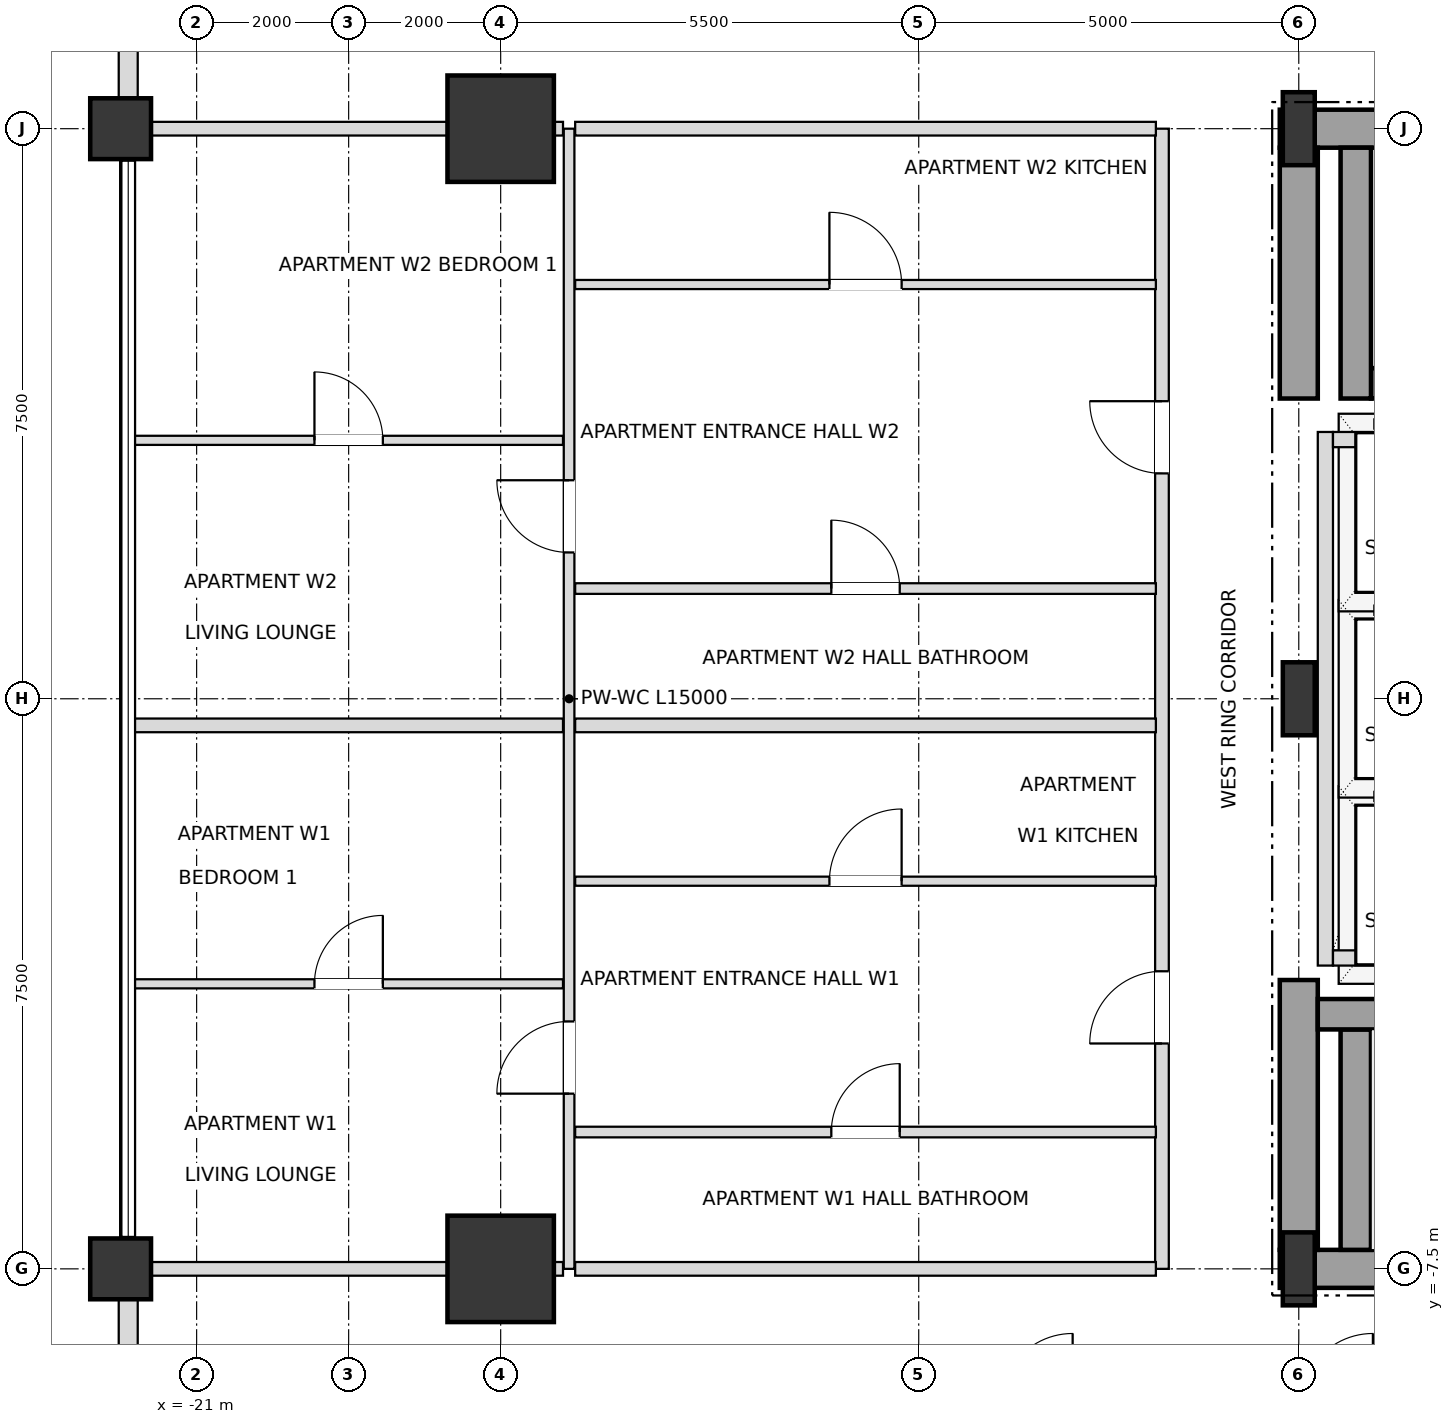
"""IFC4 building model, lengths in metres.
Left out: names, types, materials, properties, quantities, classifications, styles, units other than length and angle.
Written with IfcOpenShell. Run it as: python <this file> out.ifc"""

import sys

from ifc_helpers import new_model, si_unit, direction, frame, frame_2d, origin, origin_2d, place, context, subcontext, project, spatial, rectangle, i_section, extrude, element, fill, save


model = new_model("IFC4")
c1 = context("Model", 3, precision=1e-05, world=origin(), true_north=direction((0.0, 1.0)))
c2 = subcontext(c1, "Body", "Model", "MODEL_VIEW")
j1 = project(units=[si_unit("LENGTHUNIT", "METRE"), si_unit("PLANEANGLEUNIT", "RADIAN")], contexts=[c1])
p1 = place(None, origin())
s1 = spatial("IfcSite", under=j1, at=p1, CompositionType="ELEMENT")
p2 = place(p1, origin())
s2 = spatial("IfcBuilding", under=s1, at=p2, CompositionType="ELEMENT")
p3 = place(p2, frame((0.0, 0.0, 90.0)))
s3 = spatial("IfcBuildingStorey", under=s2, at=p3, CompositionType="ELEMENT", Elevation=90.0)
for number, where, z_axis, x_axis in (
    (1, (-6.5, -7.5, 0.0), (0.0, 0.0, 1.0), (1.0, 0.0, 0.0)),
    (2, (-6.5, 0.0, 0.0), (0.0, 0.0, 1.0), (1.0, 0.0, 0.0)),
    (3, (-6.5, 7.5, 0.0), (0.0, 0.0, 1.0), (1.0, 0.0, 0.0)),
):
    element("IfcColumn", number, at=place(p3, frame(where, z_axis=z_axis, x_axis=x_axis)), inside=s3, PredefinedType="COLUMN", context=c2, shape_type="SweptSolid", body=[
        extrude(i_section(OverallWidth=0.42, OverallDepth=0.96, WebThickness=0.022, FlangeThickness=0.034, at=origin_2d()), origin(), (0.0, 0.0, 1.0), 3.6),
    ])
for number, where, z_axis, x_axis in (
    (4, (-17.0, 7.5, 0.0), (0.0, 0.0, 1.0), (1.0, 0.0, 0.0)),
    (5, (-17.0, -7.5, 0.0), (0.0, 0.0, 1.0), (1.0, 0.0, 0.0)),
):
    element("IfcColumn", number, at=place(p3, frame(where, z_axis=z_axis, x_axis=x_axis)), inside=s3, PredefinedType="USERDEFINED", context=c2, shape_type="SweptSolid", body=[
        extrude(rectangle(XDim=1.4, YDim=1.4, at=origin_2d()), origin(), (0.0, 0.0, 1.0), 3.6),
    ])
for number, where, z_axis, x_axis in (
    (6, (-22.0, -7.5, 0.0), (0.0, 0.0, 1.0), (1.0, 0.0, 0.0)),
    (7, (-22.0, 7.5, 0.0), (0.0, 0.0, 1.0), (1.0, 0.0, 0.0)),
):
    element("IfcColumn", number, at=place(p3, frame(where, z_axis=z_axis, x_axis=x_axis)), inside=s3, PredefinedType="COLUMN", context=c2, shape_type="SweptSolid", body=[
        extrude(rectangle(XDim=0.8, YDim=0.8, at=origin_2d()), origin(), (0.0, 0.0, 1.0), 3.6),
    ])
p4 = place(p3, frame((-21.9, 12.605, 0.0), z_axis=(0.0, 0.0, 1.0), x_axis=(0.0, -1.0, 0.0)))
e8 = element("IfcWall", 8, at=p4, inside=s3, PredefinedType="SOLIDWALL", context=c2, shape_type="SweptSolid", body=[
    extrude(rectangle(XDim=4.71, YDim=0.25, at=frame_2d((2.355, 0.0))), origin(), (0.0, 0.0, 1.0), 2.59),
])
p5 = place(p4, frame((1.455, 0.0, 0.72)))
e9 = element("IfcOpeningElement", 9, at=p5, cuts=e8, PredefinedType="OPENING", context=c2, shape_type="SweptSolid", body=[
    extrude(rectangle(XDim=1.8, YDim=1.68, at=frame_2d((0.9, 0.84))), frame((0.0, 0.135, 0.0), z_axis=(0.0, -1.0, 0.0), x_axis=(1.0, 0.0, 0.0)), (0.0, 0.0, 1.0), 0.27),
])
p6 = place(p3, frame((-21.9, -7.895, 0.0), z_axis=(0.0, 0.0, 1.0), x_axis=(0.0, -1.0, 0.0)))
e10 = element("IfcWall", 10, at=p6, inside=s3, PredefinedType="SOLIDWALL", context=c2, shape_type="SweptSolid", body=[
    extrude(rectangle(XDim=4.71, YDim=0.25, at=frame_2d((2.355, 0.0))), origin(), (0.0, 0.0, 1.0), 2.59),
])
p7 = place(p6, frame((1.455, 0.0, 0.72)))
e11 = element("IfcOpeningElement", 11, at=p7, cuts=e10, PredefinedType="OPENING", context=c2, shape_type="SweptSolid", body=[
    extrude(rectangle(XDim=1.8, YDim=1.68, at=frame_2d((0.9, 0.84))), frame((0.0, 0.135, 0.0), z_axis=(0.0, -1.0, 0.0), x_axis=(1.0, 0.0, 0.0)), (0.0, 0.0, 1.0), 0.27),
])
p8 = place(p3, frame((-6.75, -7.5, 0.0), z_axis=(0.0, 0.0, 1.0), x_axis=(1.0, 0.0, 0.0)))
e12 = element("IfcWall", 12, at=p8, inside=s3, PredefinedType="SHEAR", context=c2, shape_type="SweptSolid", body=[
    extrude(rectangle(XDim=6.75, YDim=0.5, at=frame_2d((3.375, 0.0))), origin(), (0.0, 0.0, 1.0), 3.3),
])
p9 = place(p3, frame((-6.75, 7.5, 0.0), z_axis=(0.0, 0.0, 1.0), x_axis=(1.0, 0.0, 0.0)))
e13 = element("IfcWall", 13, at=p9, inside=s3, PredefinedType="SHEAR", context=c2, shape_type="SweptSolid", body=[
    extrude(rectangle(XDim=6.75, YDim=0.5, at=frame_2d((3.375, 0.0))), origin(), (0.0, 0.0, 1.0), 3.3),
])
p10 = place(p9, frame((1.65, 0.0, 0.0)))
e14 = element("IfcOpeningElement", 14, at=p10, cuts=e13, PredefinedType="OPENING", context=c2, shape_type="SweptSolid", body=[
    extrude(rectangle(XDim=1.05, YDim=2.15, at=frame_2d((0.525, 1.075))), frame((0.0, 0.26, 0.0), z_axis=(0.0, -1.0, 0.0), x_axis=(1.0, 0.0, 0.0)), (0.0, 0.0, 1.0), 0.52),
])
p11 = place(p3, frame((-6.5, -7.25, 0.0), z_axis=(0.0, 0.0, 1.0), x_axis=(0.0, 1.0, 0.0)))
e15 = element("IfcWall", 15, at=p11, inside=s3, PredefinedType="SHEAR", context=c2, shape_type="SweptSolid", body=[
    extrude(rectangle(XDim=3.55, YDim=0.5, at=frame_2d((1.775, 0.0))), origin(), (0.0, 0.0, 1.0), 3.3),
])
p12 = place(p3, frame((-6.5, 3.95, 0.0), z_axis=(0.0, 0.0, 1.0), x_axis=(0.0, 1.0, 0.0)))
e16 = element("IfcWall", 16, at=p12, inside=s3, PredefinedType="SHEAR", context=c2, shape_type="SweptSolid", body=[
    extrude(rectangle(XDim=3.3, YDim=0.5, at=frame_2d((1.65, 0.0))), origin(), (0.0, 0.0, 1.0), 3.3),
])
p13 = place(p3, frame((-5.75, -7.25, 0.0), z_axis=(0.0, 0.0, 1.0), x_axis=(0.0, 1.0, 0.0)))
e17 = element("IfcWall", 17, at=p13, inside=s3, PredefinedType="SHEAR", context=c2, shape_type="SweptSolid", body=[
    extrude(rectangle(XDim=2.9, YDim=0.4, at=frame_2d((1.45, 0.0))), origin(), (0.0, 0.0, 1.0), 3.3),
])
p14 = place(p3, frame((-6.25, -4.15, 0.0), z_axis=(0.0, 0.0, 1.0), x_axis=(1.0, 0.0, 0.0)))
e18 = element("IfcWall", 18, at=p14, inside=s3, PredefinedType="SHEAR", context=c2, shape_type="SweptSolid", body=[
    extrude(rectangle(XDim=7.78, YDim=0.4, at=frame_2d((3.89, 0.0))), origin(), (0.0, 0.0, 1.0), 3.3),
])
p15 = place(p3, frame((-5.55, 4.15, 0.0), z_axis=(0.0, 0.0, 1.0), x_axis=(1.0, 0.0, 0.0)))
e19 = element("IfcWall", 19, at=p15, inside=s3, PredefinedType="SHEAR", context=c2, shape_type="SweptSolid", body=[
    extrude(rectangle(XDim=7.08, YDim=0.4, at=frame_2d((3.54, 0.0))), origin(), (0.0, 0.0, 1.0), 3.3),
])
p16 = place(p3, frame((-5.75, 3.95, 0.0), z_axis=(0.0, 0.0, 1.0), x_axis=(0.0, 1.0, 0.0)))
e20 = element("IfcWall", 20, at=p16, inside=s3, PredefinedType="SHEAR", context=c2, shape_type="SweptSolid", body=[
    extrude(rectangle(XDim=3.3, YDim=0.4, at=frame_2d((1.65, 0.0))), origin(), (0.0, 0.0, 1.0), 3.3),
])
p17 = place(p3, frame((-6.15, -3.51, 0.0), z_axis=(0.0, 0.0, 1.0), x_axis=(0.0, 1.0, 0.0)))
e21 = element("IfcWall", 21, at=p17, inside=s3, PredefinedType="SOLIDWALL", context=c2, shape_type="SweptSolid", body=[
    extrude(rectangle(XDim=7.02, YDim=0.2, at=frame_2d((3.51, 0.0))), origin(), (0.0, 0.0, 1.0), 3.3),
])
for number, where, z_axis, x_axis in (
    (22, (-6.05, -3.41, 0.0), (0.0, 0.0, 1.0), (1.0, 0.0, 0.0)),
    (23, (-6.05, 3.41, 0.0), (0.0, 0.0, 1.0), (1.0, 0.0, 0.0)),
):
    element("IfcWall", number, at=place(p3, frame(where, z_axis=z_axis, x_axis=x_axis)), inside=s3, PredefinedType="SOLIDWALL", context=c2, shape_type="SweptSolid", body=[
        extrude(rectangle(XDim=2.2, YDim=0.2, at=frame_2d((1.1, 0.0))), origin(), (0.0, 0.0, 1.0), 3.3),
    ])
p18 = place(p3, frame((-16.1, -7.5, 0.0), z_axis=(0.0, 0.0, 1.0), x_axis=(0.0, 1.0, 0.0)))
e24 = element("IfcWall", 24, at=p18, inside=s3, PredefinedType="PARTITIONING", context=c2, shape_type="SweptSolid", body=[
    extrude(rectangle(XDim=15.0, YDim=0.14, at=frame_2d((7.5, 0.0))), origin(), (0.0, 0.0, 1.0), 3.3),
])
p19 = place(p18, frame((2.305, 0.0, 0.0)))
e25 = element("IfcOpeningElement", 25, at=p19, cuts=e24, PredefinedType="OPENING", context=c2, shape_type="SweptSolid", body=[
    extrude(rectangle(XDim=0.95, YDim=2.1, at=frame_2d((0.475, 1.05))), frame((0.0, 0.08, 0.0), z_axis=(0.0, -1.0, 0.0), x_axis=(1.0, 0.0, 0.0)), (0.0, 0.0, 1.0), 0.16),
])
p20 = place(p18, frame((9.425, 0.0, 0.0)))
e26 = element("IfcOpeningElement", 26, at=p20, cuts=e24, PredefinedType="OPENING", context=c2, shape_type="SweptSolid", body=[
    extrude(rectangle(XDim=0.95, YDim=2.1, at=frame_2d((0.475, 1.05))), frame((0.0, 0.08, 0.0), z_axis=(0.0, -1.0, 0.0), x_axis=(1.0, 0.0, 0.0)), (0.0, 0.0, 1.0), 0.16),
])
p21 = place(p3, frame((-8.3, -7.5, 0.0), z_axis=(0.0, 0.0, 1.0), x_axis=(0.0, 1.0, 0.0)))
e27 = element("IfcWall", 27, at=p21, inside=s3, PredefinedType="PARTITIONING", context=c2, shape_type="SweptSolid", body=[
    extrude(rectangle(XDim=15.0, YDim=0.18, at=frame_2d((7.5, 0.0))), origin(), (0.0, 0.0, 1.0), 3.3),
])
p22 = place(p21, frame((2.965, 0.0, 0.0)))
e28 = element("IfcOpeningElement", 28, at=p22, cuts=e27, PredefinedType="OPENING", context=c2, shape_type="SweptSolid", body=[
    extrude(rectangle(XDim=0.95, YDim=2.15, at=frame_2d((0.475, 1.075))), frame((0.0, 0.1, 0.0), z_axis=(0.0, -1.0, 0.0), x_axis=(1.0, 0.0, 0.0)), (0.0, 0.0, 1.0), 0.2),
])
p23 = place(p21, frame((10.465, 0.0, 0.0)))
e29 = element("IfcOpeningElement", 29, at=p23, cuts=e27, PredefinedType="OPENING", context=c2, shape_type="SweptSolid", body=[
    extrude(rectangle(XDim=0.95, YDim=2.15, at=frame_2d((0.475, 1.075))), frame((0.0, 0.1, 0.0), z_axis=(0.0, -1.0, 0.0), x_axis=(1.0, 0.0, 0.0)), (0.0, 0.0, 1.0), 0.2),
])
p24 = place(p3, frame((-21.9, -7.5, 0.0), z_axis=(0.0, 0.0, 1.0), x_axis=(1.0, 0.0, 0.0)))
e30 = element("IfcWall", 30, at=p24, inside=s3, PredefinedType="PARTITIONING", context=c2, shape_type="SweptSolid", body=[
    extrude(rectangle(XDim=5.72, YDim=0.18, at=frame_2d((2.86, 0.0))), origin(), (0.0, 0.0, 1.0), 2.736),
])
p25 = place(p3, frame((-16.02, -7.5, 0.0), z_axis=(0.0, 0.0, 1.0), x_axis=(1.0, 0.0, 0.0)))
e31 = element("IfcWall", 31, at=p25, inside=s3, PredefinedType="PARTITIONING", context=c2, shape_type="SweptSolid", body=[
    extrude(rectangle(XDim=7.64, YDim=0.18, at=frame_2d((3.82, 0.0))), origin(), (0.0, 0.0, 1.0), 2.736),
])
p26 = place(p3, frame((-16.02, -5.7, 0.0), z_axis=(0.0, 0.0, 1.0), x_axis=(1.0, 0.0, 0.0)))
e32 = element("IfcWall", 32, at=p26, inside=s3, PredefinedType="PARTITIONING", context=c2, shape_type="SweptSolid", body=[
    extrude(rectangle(XDim=7.64, YDim=0.14, at=frame_2d((3.82, 0.0))), origin(), (0.0, 0.0, 1.0), 2.868),
])
p27 = place(p26, frame((3.37, 0.0, 0.0)))
e33 = element("IfcOpeningElement", 33, at=p27, cuts=e32, PredefinedType="OPENING", context=c2, shape_type="SweptSolid", body=[
    extrude(rectangle(XDim=0.9, YDim=2.1, at=frame_2d((0.45, 1.05))), frame((0.0, 0.08, 0.0), z_axis=(0.0, -1.0, 0.0), x_axis=(1.0, 0.0, 0.0)), (0.0, 0.0, 1.0), 0.16),
])
p28 = place(p3, frame((-21.82, -3.75, 0.0), z_axis=(0.0, 0.0, 1.0), x_axis=(1.0, 0.0, 0.0)))
e34 = element("IfcWall", 34, at=p28, inside=s3, PredefinedType="PARTITIONING", context=c2, shape_type="SweptSolid", body=[
    extrude(rectangle(XDim=5.64, YDim=0.12, at=frame_2d((2.82, 0.0))), origin(), (0.0, 0.0, 1.0), 2.736),
])
p29 = place(p28, frame((2.37, 0.0, 0.0)))
e35 = element("IfcOpeningElement", 35, at=p29, cuts=e34, PredefinedType="OPENING", context=c2, shape_type="SweptSolid", body=[
    extrude(rectangle(XDim=0.9, YDim=2.1, at=frame_2d((0.45, 1.05))), frame((0.0, 0.07, 0.0), z_axis=(0.0, -1.0, 0.0), x_axis=(1.0, 0.0, 0.0)), (0.0, 0.0, 1.0), 0.14),
])
p30 = place(p3, frame((-16.02, -2.4, 0.0), z_axis=(0.0, 0.0, 1.0), x_axis=(1.0, 0.0, 0.0)))
e36 = element("IfcWall", 36, at=p30, inside=s3, PredefinedType="PARTITIONING", context=c2, shape_type="SweptSolid", body=[
    extrude(rectangle(XDim=7.64, YDim=0.12, at=frame_2d((3.82, 0.0))), origin(), (0.0, 0.0, 1.0), 2.868),
])
p31 = place(p30, frame((3.345, 0.0, 0.0)))
e37 = element("IfcOpeningElement", 37, at=p31, cuts=e36, PredefinedType="OPENING", context=c2, shape_type="SweptSolid", body=[
    extrude(rectangle(XDim=0.95, YDim=2.1, at=frame_2d((0.475, 1.05))), frame((0.0, 0.07, 0.0), z_axis=(0.0, -1.0, 0.0), x_axis=(1.0, 0.0, 0.0)), (0.0, 0.0, 1.0), 0.14),
])
p32 = place(p3, frame((-21.82, -0.35, 0.0), z_axis=(0.0, 0.0, 1.0), x_axis=(1.0, 0.0, 0.0)))
e38 = element("IfcWall", 38, at=p32, inside=s3, PredefinedType="PARTITIONING", context=c2, shape_type="SweptSolid", body=[
    extrude(rectangle(XDim=5.64, YDim=0.18, at=frame_2d((2.82, 0.0))), origin(), (0.0, 0.0, 1.0), 2.736),
])
p33 = place(p3, frame((-16.02, -0.35, 0.0), z_axis=(0.0, 0.0, 1.0), x_axis=(1.0, 0.0, 0.0)))
e39 = element("IfcWall", 39, at=p33, inside=s3, PredefinedType="PARTITIONING", context=c2, shape_type="SweptSolid", body=[
    extrude(rectangle(XDim=7.64, YDim=0.18, at=frame_2d((3.82, 0.0))), origin(), (0.0, 0.0, 1.0), 2.868),
])
p34 = place(p3, frame((-16.02, 1.45, 0.0), z_axis=(0.0, 0.0, 1.0), x_axis=(1.0, 0.0, 0.0)))
e40 = element("IfcWall", 40, at=p34, inside=s3, PredefinedType="PARTITIONING", context=c2, shape_type="SweptSolid", body=[
    extrude(rectangle(XDim=7.64, YDim=0.14, at=frame_2d((3.82, 0.0))), origin(), (0.0, 0.0, 1.0), 2.868),
])
p35 = place(p34, frame((3.37, 0.0, 0.0)))
e41 = element("IfcOpeningElement", 41, at=p35, cuts=e40, PredefinedType="OPENING", context=c2, shape_type="SweptSolid", body=[
    extrude(rectangle(XDim=0.9, YDim=2.1, at=frame_2d((0.45, 1.05))), frame((0.0, 0.08, 0.0), z_axis=(0.0, -1.0, 0.0), x_axis=(1.0, 0.0, 0.0)), (0.0, 0.0, 1.0), 0.16),
])
p36 = place(p3, frame((-21.82, 3.4, 0.0), z_axis=(0.0, 0.0, 1.0), x_axis=(1.0, 0.0, 0.0)))
e42 = element("IfcWall", 42, at=p36, inside=s3, PredefinedType="PARTITIONING", context=c2, shape_type="SweptSolid", body=[
    extrude(rectangle(XDim=5.64, YDim=0.12, at=frame_2d((2.82, 0.0))), origin(), (0.0, 0.0, 1.0), 2.736),
])
p37 = place(p36, frame((2.37, 0.0, 0.0)))
e43 = element("IfcOpeningElement", 43, at=p37, cuts=e42, PredefinedType="OPENING", context=c2, shape_type="SweptSolid", body=[
    extrude(rectangle(XDim=0.9, YDim=2.1, at=frame_2d((0.45, 1.05))), frame((0.0, 0.07, 0.0), z_axis=(0.0, -1.0, 0.0), x_axis=(1.0, 0.0, 0.0)), (0.0, 0.0, 1.0), 0.14),
])
p38 = place(p3, frame((-16.02, 5.45, 0.0), z_axis=(0.0, 0.0, 1.0), x_axis=(1.0, 0.0, 0.0)))
e44 = element("IfcWall", 44, at=p38, inside=s3, PredefinedType="PARTITIONING", context=c2, shape_type="SweptSolid", body=[
    extrude(rectangle(XDim=7.64, YDim=0.12, at=frame_2d((3.82, 0.0))), origin(), (0.0, 0.0, 1.0), 2.868),
])
p39 = place(p38, frame((3.345, 0.0, 0.0)))
e45 = element("IfcOpeningElement", 45, at=p39, cuts=e44, PredefinedType="OPENING", context=c2, shape_type="SweptSolid", body=[
    extrude(rectangle(XDim=0.95, YDim=2.1, at=frame_2d((0.475, 1.05))), frame((0.0, 0.07, 0.0), z_axis=(0.0, -1.0, 0.0), x_axis=(1.0, 0.0, 0.0)), (0.0, 0.0, 1.0), 0.14),
])
p40 = place(p3, frame((-21.9, 7.5, 0.0), z_axis=(0.0, 0.0, 1.0), x_axis=(1.0, 0.0, 0.0)))
e46 = element("IfcWall", 46, at=p40, inside=s3, PredefinedType="PARTITIONING", context=c2, shape_type="SweptSolid", body=[
    extrude(rectangle(XDim=5.72, YDim=0.18, at=frame_2d((2.86, 0.0))), origin(), (0.0, 0.0, 1.0), 2.736),
])
p41 = place(p3, frame((-16.02, 7.5, 0.0), z_axis=(0.0, 0.0, 1.0), x_axis=(1.0, 0.0, 0.0)))
e47 = element("IfcWall", 47, at=p41, inside=s3, PredefinedType="PARTITIONING", context=c2, shape_type="SweptSolid", body=[
    extrude(rectangle(XDim=7.64, YDim=0.18, at=frame_2d((3.82, 0.0))), origin(), (0.0, 0.0, 1.0), 2.736),
])
p42 = place(p27, origin())
e48 = element("IfcDoor", 48, at=p42, inside=s3, OperationType="SINGLE_SWING_RIGHT", PredefinedType="DOOR", context=c2, shape_type="SweptSolid", body=[
    extrude(rectangle(XDim=0.9, YDim=2.1, at=frame_2d((0.45, 1.05))), frame((0.0, 0.025, 0.0), z_axis=(0.0, -1.0, 0.0), x_axis=(1.0, 0.0, 0.0)), (0.0, 0.0, 1.0), 0.05),
])
fill(e33, e48)
p43 = place(p22, origin())
e49 = element("IfcDoor", 49, at=p43, inside=s3, OperationType="SINGLE_SWING_LEFT", PredefinedType="DOOR", context=c2, shape_type="SweptSolid", body=[
    extrude(rectangle(XDim=0.95, YDim=2.15, at=frame_2d((0.475, 1.075))), frame((0.0, 0.025, 0.0), z_axis=(0.0, -1.0, 0.0), x_axis=(1.0, 0.0, 0.0)), (0.0, 0.0, 1.0), 0.05),
])
fill(e28, e49)
p44 = place(p31, origin())
e50 = element("IfcDoor", 50, at=p44, inside=s3, OperationType="SINGLE_SWING_RIGHT", PredefinedType="DOOR", context=c2, shape_type="SweptSolid", body=[
    extrude(rectangle(XDim=0.95, YDim=2.1, at=frame_2d((0.475, 1.05))), frame((0.0, 0.025, 0.0), z_axis=(0.0, -1.0, 0.0), x_axis=(1.0, 0.0, 0.0)), (0.0, 0.0, 1.0), 0.05),
])
fill(e37, e50)
p45 = place(p19, origin())
e51 = element("IfcDoor", 51, at=p45, inside=s3, OperationType="SINGLE_SWING_LEFT", PredefinedType="DOOR", context=c2, shape_type="SweptSolid", body=[
    extrude(rectangle(XDim=0.95, YDim=2.1, at=frame_2d((0.475, 1.05))), frame((0.0, 0.025, 0.0), z_axis=(0.0, -1.0, 0.0), x_axis=(1.0, 0.0, 0.0)), (0.0, 0.0, 1.0), 0.05),
])
fill(e25, e51)
p46 = place(p29, origin())
e52 = element("IfcDoor", 52, at=p46, inside=s3, OperationType="SINGLE_SWING_RIGHT", PredefinedType="DOOR", context=c2, shape_type="SweptSolid", body=[
    extrude(rectangle(XDim=0.9, YDim=2.1, at=frame_2d((0.45, 1.05))), frame((0.0, 0.025, 0.0), z_axis=(0.0, -1.0, 0.0), x_axis=(1.0, 0.0, 0.0)), (0.0, 0.0, 1.0), 0.05),
])
fill(e35, e52)
p47 = place(p35, origin())
e53 = element("IfcDoor", 53, at=p47, inside=s3, OperationType="SINGLE_SWING_LEFT", PredefinedType="DOOR", context=c2, shape_type="SweptSolid", body=[
    extrude(rectangle(XDim=0.9, YDim=2.1, at=frame_2d((0.45, 1.05))), frame((0.0, 0.025, 0.0), z_axis=(0.0, -1.0, 0.0), x_axis=(1.0, 0.0, 0.0)), (0.0, 0.0, 1.0), 0.05),
])
fill(e41, e53)
p48 = place(p23, origin())
e54 = element("IfcDoor", 54, at=p48, inside=s3, OperationType="SINGLE_SWING_RIGHT", PredefinedType="DOOR", context=c2, shape_type="SweptSolid", body=[
    extrude(rectangle(XDim=0.95, YDim=2.15, at=frame_2d((0.475, 1.075))), frame((0.0, 0.025, 0.0), z_axis=(0.0, -1.0, 0.0), x_axis=(1.0, 0.0, 0.0)), (0.0, 0.0, 1.0), 0.05),
])
fill(e29, e54)
p49 = place(p39, origin())
e55 = element("IfcDoor", 55, at=p49, inside=s3, OperationType="SINGLE_SWING_LEFT", PredefinedType="DOOR", context=c2, shape_type="SweptSolid", body=[
    extrude(rectangle(XDim=0.95, YDim=2.1, at=frame_2d((0.475, 1.05))), frame((0.0, 0.025, 0.0), z_axis=(0.0, -1.0, 0.0), x_axis=(1.0, 0.0, 0.0)), (0.0, 0.0, 1.0), 0.05),
])
fill(e45, e55)
p50 = place(p20, origin())
e56 = element("IfcDoor", 56, at=p50, inside=s3, OperationType="SINGLE_SWING_RIGHT", PredefinedType="DOOR", context=c2, shape_type="SweptSolid", body=[
    extrude(rectangle(XDim=0.95, YDim=2.1, at=frame_2d((0.475, 1.05))), frame((0.0, 0.025, 0.0), z_axis=(0.0, -1.0, 0.0), x_axis=(1.0, 0.0, 0.0)), (0.0, 0.0, 1.0), 0.05),
])
fill(e26, e56)
p51 = place(p37, origin())
e57 = element("IfcDoor", 57, at=p51, inside=s3, OperationType="SINGLE_SWING_LEFT", PredefinedType="DOOR", context=c2, shape_type="SweptSolid", body=[
    extrude(rectangle(XDim=0.9, YDim=2.1, at=frame_2d((0.45, 1.05))), frame((0.0, 0.025, 0.0), z_axis=(0.0, -1.0, 0.0), x_axis=(1.0, 0.0, 0.0)), (0.0, 0.0, 1.0), 0.05),
])
fill(e43, e57)
save(model, sys.argv[1])
